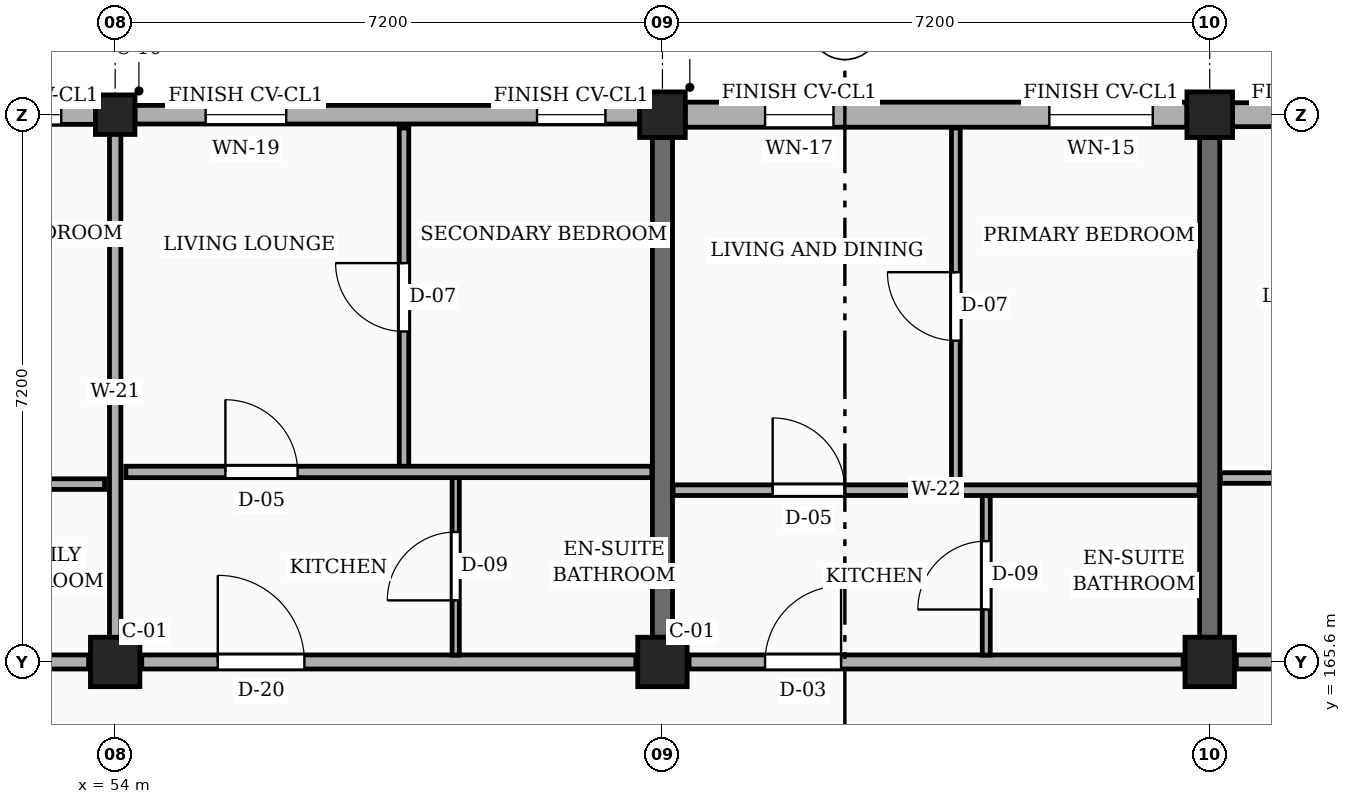
"""IFC4 building model, lengths in metres.
Left out: names, types, materials, properties, quantities, classifications, styles, units other than length and angle.
Written with IfcOpenShell. Run it as: python <this file> out.ifc"""

import sys

from ifc_helpers import new_model, si_unit, direction, frame, frame_2d, origin, origin_2d, place, context, subcontext, project, spatial, rectangle, circle, extrude, element, fill, save


model = new_model("IFC4")
c1 = context("Model", 3, precision=1e-05, world=origin(), true_north=direction((0.0, 1.0)))
c2 = subcontext(c1, "Body", "Model", "MODEL_VIEW")
j1 = project(units=[si_unit("LENGTHUNIT", "METRE"), si_unit("PLANEANGLEUNIT", "RADIAN")], contexts=[c1])
p1 = place(None, origin())
s1 = spatial("IfcSite", under=j1, at=p1, CompositionType="ELEMENT")
p2 = place(p1, origin())
s2 = spatial("IfcBuilding", under=s1, at=p2, CompositionType="ELEMENT")
p3 = place(p2, origin())
s3 = spatial("IfcBuildingStorey", under=s2, at=p3, CompositionType="ELEMENT", Elevation=0.0)
p4 = place(p3, frame((54.0, 165.6, 0.0), z_axis=(0.0, 0.0, 1.0), x_axis=(1.0, 0.0, 0.0)))
e1 = element("IfcColumn", 1, at=p4, inside=s3, PredefinedType="COLUMN", context=c2, shape_type="SweptSolid", body=[
    extrude(rectangle(XDim=0.65, YDim=0.65, at=origin_2d()), origin(), (0.0, 0.0, 1.0), 4.5),
])
p5 = place(p3, frame((54.0, 172.8, 0.0), z_axis=(0.0, 0.0, 1.0), x_axis=(1.0, 0.0, 0.0)))
e2 = element("IfcColumn", 2, at=p5, inside=s3, PredefinedType="COLUMN", context=c2, shape_type="SweptSolid", body=[
    extrude(circle(Radius=0.26, at=origin_2d()), origin(), (0.0, 0.0, 1.0), 4.5),
])
p6 = place(p3, frame((61.2, 165.6, 0.0), z_axis=(0.0, 0.0, 1.0), x_axis=(1.0, 0.0, 0.0)))
e3 = element("IfcColumn", 3, at=p6, inside=s3, PredefinedType="COLUMN", context=c2, shape_type="SweptSolid", body=[
    extrude(rectangle(XDim=0.65, YDim=0.65, at=origin_2d()), origin(), (0.0, 0.0, 1.0), 4.5),
])
p7 = place(p3, frame((61.2, 172.8, 0.0), z_axis=(0.0, 0.0, 1.0), x_axis=(1.0, 0.0, 0.0)))
e4 = element("IfcColumn", 4, at=p7, inside=s3, PredefinedType="COLUMN", context=c2, shape_type="SweptSolid", body=[
    extrude(rectangle(XDim=0.6, YDim=0.6, at=origin_2d()), origin(), (0.0, 0.0, 1.0), 4.5),
])
p8 = place(p3, frame((68.4, 165.6, 0.0), z_axis=(0.0, 0.0, 1.0), x_axis=(1.0, 0.0, 0.0)))
e5 = element("IfcColumn", 5, at=p8, inside=s3, PredefinedType="COLUMN", context=c2, shape_type="SweptSolid", body=[
    extrude(rectangle(XDim=0.65, YDim=0.65, at=origin_2d()), origin(), (0.0, 0.0, 1.0), 4.5),
])
p9 = place(p3, frame((68.4, 172.8, 0.0), z_axis=(0.0, 0.0, 1.0), x_axis=(1.0, 0.0, 0.0)))
e6 = element("IfcColumn", 6, at=p9, inside=s3, PredefinedType="COLUMN", context=c2, shape_type="SweptSolid", body=[
    extrude(rectangle(XDim=0.6, YDim=0.6, at=origin_2d()), origin(), (0.0, 0.0, 1.0), 4.5),
])
for number, where, z_axis, x_axis in (
    (7, (61.2, 165.925, 0.0), (0.0, 0.0, 1.0), (0.0, 1.0, 0.0)),
    (8, (68.4, 165.925, 0.0), (0.0, 0.0, 1.0), (0.0, 1.0, 0.0)),
):
    element("IfcWall", number, at=place(p3, frame(where, z_axis=z_axis, x_axis=x_axis)), inside=s3, PredefinedType="SOLIDWALL", context=c2, shape_type="SweptSolid", body=[
        extrude(rectangle(XDim=6.575, YDim=0.265, at=frame_2d((3.288, 0.0))), origin(), (0.0, 0.0, 1.0), 3.535),
    ])
p10 = place(p3, frame((75.3, 172.8, 0.0), z_axis=(0.0, 0.0, 1.0), x_axis=(-1.0, 0.0, 0.0)))
e9 = element("IfcWall", 9, at=p10, inside=s3, PredefinedType="SOLIDWALL", context=c2, shape_type="SweptSolid", body=[
    extrude(rectangle(XDim=6.6, YDim=0.315, at=frame_2d((3.3, 0.0))), origin(), (0.0, 0.0, 1.0), 3.805),
])
p11 = place(p10, frame((0.45, 0.0, 0.78)))
e10 = element("IfcOpeningElement", 10, at=p11, cuts=e9, PredefinedType="OPENING", context=c2, shape_type="SweptSolid", body=[
    extrude(rectangle(XDim=1.2, YDim=1.26, at=frame_2d((0.6, 0.63))), frame((0.0, 0.167, 0.0), z_axis=(0.0, -1.0, 0.0), x_axis=(1.0, 0.0, 0.0)), (0.0, 0.0, 1.0), 0.335),
])
p12 = place(p10, frame((4.65, 0.0, 0.78)))
e11 = element("IfcOpeningElement", 11, at=p12, cuts=e9, PredefinedType="OPENING", context=c2, shape_type="SweptSolid", body=[
    extrude(rectangle(XDim=1.36, YDim=1.26, at=frame_2d((0.68, 0.63))), frame((0.0, 0.167, 0.0), z_axis=(0.0, -1.0, 0.0), x_axis=(1.0, 0.0, 0.0)), (0.0, 0.0, 1.0), 0.335),
])
p13 = place(p3, frame((68.1, 172.8, 0.0), z_axis=(0.0, 0.0, 1.0), x_axis=(-1.0, 0.0, 0.0)))
e12 = element("IfcWall", 12, at=p13, inside=s3, PredefinedType="SOLIDWALL", context=c2, shape_type="SweptSolid", body=[
    extrude(rectangle(XDim=6.6, YDim=0.33, at=frame_2d((3.3, 0.0))), origin(), (0.0, 0.0, 1.0), 3.805),
])
p14 = place(p13, frame((0.45, 0.0, 0.78)))
e13 = element("IfcOpeningElement", 13, at=p14, cuts=e12, PredefinedType="OPENING", context=c2, shape_type="SweptSolid", body=[
    extrude(rectangle(XDim=1.36, YDim=1.26, at=frame_2d((0.68, 0.63))), frame((0.0, 0.175, 0.0), z_axis=(0.0, -1.0, 0.0), x_axis=(1.0, 0.0, 0.0)), (0.0, 0.0, 1.0), 0.35),
])
p15 = place(p13, frame((4.65, 0.0, 0.78)))
e14 = element("IfcOpeningElement", 14, at=p15, cuts=e12, PredefinedType="OPENING", context=c2, shape_type="SweptSolid", body=[
    extrude(rectangle(XDim=0.9, YDim=1.36, at=frame_2d((0.45, 0.68))), frame((0.0, 0.175, 0.0), z_axis=(0.0, -1.0, 0.0), x_axis=(1.0, 0.0, 0.0)), (0.0, 0.0, 1.0), 0.35),
])
p16 = place(p3, frame((60.9, 172.8, 0.0), z_axis=(0.0, 0.0, 1.0), x_axis=(-1.0, 0.0, 0.0)))
e15 = element("IfcWall", 15, at=p16, inside=s3, PredefinedType="SOLIDWALL", context=c2, shape_type="SweptSolid", body=[
    extrude(rectangle(XDim=6.64, YDim=0.245, at=frame_2d((3.32, 0.0))), origin(), (0.0, 0.0, 1.0), 3.805),
])
p17 = place(p16, frame((0.45, 0.0, 0.78)))
e16 = element("IfcOpeningElement", 16, at=p17, cuts=e15, PredefinedType="OPENING", context=c2, shape_type="SweptSolid", body=[
    extrude(rectangle(XDim=0.9, YDim=1.36, at=frame_2d((0.45, 0.68))), frame((0.0, 0.133, 0.0), z_axis=(0.0, -1.0, 0.0), x_axis=(1.0, 0.0, 0.0)), (0.0, 0.0, 1.0), 0.265),
])
p18 = place(p16, frame((4.65, 0.0, 0.78)))
e17 = element("IfcOpeningElement", 17, at=p18, cuts=e15, PredefinedType="OPENING", context=c2, shape_type="SweptSolid", body=[
    extrude(rectangle(XDim=1.06, YDim=1.36, at=frame_2d((0.53, 0.68))), frame((0.0, 0.133, 0.0), z_axis=(0.0, -1.0, 0.0), x_axis=(1.0, 0.0, 0.0)), (0.0, 0.0, 1.0), 0.265),
])
p19 = place(p3, frame((53.74, 172.8, 0.0), z_axis=(0.0, 0.0, 1.0), x_axis=(-1.0, 0.0, 0.0)))
e18 = element("IfcWall", 18, at=p19, inside=s3, PredefinedType="SOLIDWALL", context=c2, shape_type="SweptSolid", body=[
    extrude(rectangle(XDim=6.64, YDim=0.255, at=frame_2d((3.32, 0.0))), origin(), (0.0, 0.0, 1.0), 3.805),
])
p20 = place(p19, frame((0.45, 0.0, 0.78)))
e19 = element("IfcOpeningElement", 19, at=p20, cuts=e18, PredefinedType="OPENING", context=c2, shape_type="SweptSolid", body=[
    extrude(rectangle(XDim=1.06, YDim=1.36, at=frame_2d((0.53, 0.68))), frame((0.0, 0.137, 0.0), z_axis=(0.0, -1.0, 0.0), x_axis=(1.0, 0.0, 0.0)), (0.0, 0.0, 1.0), 0.275),
])
p21 = place(p19, frame((4.65, 0.0, 0.78)))
e20 = element("IfcOpeningElement", 20, at=p21, cuts=e18, PredefinedType="OPENING", context=c2, shape_type="SweptSolid", body=[
    extrude(rectangle(XDim=1.22, YDim=1.36, at=frame_2d((0.61, 0.68))), frame((0.0, 0.137, 0.0), z_axis=(0.0, -1.0, 0.0), x_axis=(1.0, 0.0, 0.0)), (0.0, 0.0, 1.0), 0.275),
])
p22 = place(p3, frame((47.15, 165.6, 0.0), z_axis=(0.0, 0.0, 1.0), x_axis=(1.0, 0.0, 0.0)))
e21 = element("IfcWall", 21, at=p22, inside=s3, PredefinedType="PARTITIONING", context=c2, shape_type="SweptSolid", body=[
    extrude(rectangle(XDim=6.5, YDim=0.185, at=frame_2d((3.25, 0.0))), origin(), (0.0, 0.0, 1.0), 3.435),
])
p23 = place(p22, frame((1.0, 0.0, 0.0)))
e22 = element("IfcOpeningElement", 22, at=p23, cuts=e21, PredefinedType="OPENING", context=c2, shape_type="SweptSolid", body=[
    extrude(rectangle(XDim=0.94, YDim=2.12, at=frame_2d((0.47, 1.06))), frame((0.0, 0.103, 0.0), z_axis=(0.0, -1.0, 0.0), x_axis=(1.0, 0.0, 0.0)), (0.0, 0.0, 1.0), 0.205),
])
p24 = place(p3, frame((54.35, 165.6, 0.0), z_axis=(0.0, 0.0, 1.0), x_axis=(1.0, 0.0, 0.0)))
e23 = element("IfcWall", 23, at=p24, inside=s3, PredefinedType="PARTITIONING", context=c2, shape_type="SweptSolid", body=[
    extrude(rectangle(XDim=6.5, YDim=0.185, at=frame_2d((3.25, 0.0))), origin(), (0.0, 0.0, 1.0), 3.435),
])
p25 = place(p24, frame((1.0, 0.0, 0.0)))
e24 = element("IfcOpeningElement", 24, at=p25, cuts=e23, PredefinedType="OPENING", context=c2, shape_type="SweptSolid", body=[
    extrude(rectangle(XDim=1.14, YDim=2.18, at=frame_2d((0.57, 1.09))), frame((0.0, 0.103, 0.0), z_axis=(0.0, -1.0, 0.0), x_axis=(1.0, 0.0, 0.0)), (0.0, 0.0, 1.0), 0.205),
])
p26 = place(p3, frame((61.55, 165.6, 0.0), z_axis=(0.0, 0.0, 1.0), x_axis=(1.0, 0.0, 0.0)))
e25 = element("IfcWall", 25, at=p26, inside=s3, PredefinedType="PARTITIONING", context=c2, shape_type="SweptSolid", body=[
    extrude(rectangle(XDim=6.5, YDim=0.185, at=frame_2d((3.25, 0.0))), origin(), (0.0, 0.0, 1.0), 3.435),
])
p27 = place(p26, frame((1.0, 0.0, 0.0)))
e26 = element("IfcOpeningElement", 26, at=p27, cuts=e25, PredefinedType="OPENING", context=c2, shape_type="SweptSolid", body=[
    extrude(rectangle(XDim=1.0, YDim=2.15, at=frame_2d((0.5, 1.075))), frame((0.0, 0.103, 0.0), z_axis=(0.0, -1.0, 0.0), x_axis=(1.0, 0.0, 0.0)), (0.0, 0.0, 1.0), 0.205),
])
p28 = place(p3, frame((68.75, 165.6, 0.0), z_axis=(0.0, 0.0, 1.0), x_axis=(1.0, 0.0, 0.0)))
e27 = element("IfcWall", 27, at=p28, inside=s3, PredefinedType="PARTITIONING", context=c2, shape_type="SweptSolid", body=[
    extrude(rectangle(XDim=6.5, YDim=0.185, at=frame_2d((3.25, 0.0))), origin(), (0.0, 0.0, 1.0), 3.435),
])
p29 = place(p28, frame((1.0, 0.0, 0.0)))
e28 = element("IfcOpeningElement", 28, at=p29, cuts=e27, PredefinedType="OPENING", context=c2, shape_type="SweptSolid", body=[
    extrude(rectangle(XDim=0.94, YDim=2.12, at=frame_2d((0.47, 1.06))), frame((0.0, 0.103, 0.0), z_axis=(0.0, -1.0, 0.0), x_axis=(1.0, 0.0, 0.0)), (0.0, 0.0, 1.0), 0.205),
])
p30 = place(p3, frame((54.0, 165.69, 0.0), z_axis=(0.0, 0.0, 1.0), x_axis=(0.0, 1.0, 0.0)))
e29 = element("IfcWall", 29, at=p30, inside=s3, PredefinedType="PARTITIONING", context=c2, shape_type="SweptSolid", body=[
    extrude(rectangle(XDim=6.935, YDim=0.15, at=frame_2d((3.468, 0.0))), origin(), (0.0, 0.0, 1.0), 3.485),
])
p31 = place(p3, frame((46.94, 167.94, 0.0), z_axis=(0.0, 0.0, 1.0), x_axis=(1.0, 0.0, 0.0)))
e30 = element("IfcWall", 30, at=p31, inside=s3, PredefinedType="PARTITIONING", context=c2, shape_type="SweptSolid", body=[
    extrude(rectangle(XDim=6.92, YDim=0.14, at=frame_2d((3.46, 0.0))), origin(), (0.0, 0.0, 1.0), 3.67),
])
p32 = place(p31, frame((1.31, 0.0, 0.0)))
e31 = element("IfcOpeningElement", 31, at=p32, cuts=e30, PredefinedType="OPENING", context=c2, shape_type="SweptSolid", body=[
    extrude(rectangle(XDim=0.92, YDim=2.1, at=frame_2d((0.46, 1.05))), frame((0.0, 0.08, 0.0), z_axis=(0.0, -1.0, 0.0), x_axis=(1.0, 0.0, 0.0)), (0.0, 0.0, 1.0), 0.16),
])
p33 = place(p3, frame((57.8, 168.17, 0.0), z_axis=(0.0, 0.0, 1.0), x_axis=(0.0, 1.0, 0.0)))
e32 = element("IfcWall", 32, at=p33, inside=s3, PredefinedType="PARTITIONING", context=c2, shape_type="SweptSolid", body=[
    extrude(rectangle(XDim=4.455, YDim=0.125, at=frame_2d((2.228, 0.0))), origin(), (0.0, 0.0, 1.0), 3.67),
])
p34 = place(p33, frame((1.778, 0.0, 0.0)))
e33 = element("IfcOpeningElement", 33, at=p34, cuts=e32, PredefinedType="OPENING", context=c2, shape_type="SweptSolid", body=[
    extrude(rectangle(XDim=0.9, YDim=2.1, at=frame_2d((0.45, 1.05))), frame((0.0, 0.073, 0.0), z_axis=(0.0, -1.0, 0.0), x_axis=(1.0, 0.0, 0.0)), (0.0, 0.0, 1.0), 0.145),
])
p35 = place(p3, frame((58.48, 165.69, 0.0), z_axis=(0.0, 0.0, 1.0), x_axis=(0.0, 1.0, 0.0)))
e34 = element("IfcWall", 34, at=p35, inside=s3, PredefinedType="PARTITIONING", context=c2, shape_type="SweptSolid", body=[
    extrude(rectangle(XDim=2.34, YDim=0.095, at=frame_2d((1.17, 0.0))), origin(), (0.0, 0.0, 1.0), 3.67),
])
p36 = place(p35, frame((0.72, 0.0, 0.0)))
e35 = element("IfcOpeningElement", 35, at=p36, cuts=e34, PredefinedType="OPENING", context=c2, shape_type="SweptSolid", body=[
    extrude(rectangle(XDim=0.9, YDim=2.05, at=frame_2d((0.45, 1.025))), frame((0.0, 0.058, 0.0), z_axis=(0.0, -1.0, 0.0), x_axis=(1.0, 0.0, 0.0)), (0.0, 0.0, 1.0), 0.115),
])
p37 = place(p3, frame((54.14, 168.1, 0.0), z_axis=(0.0, 0.0, 1.0), x_axis=(1.0, 0.0, 0.0)))
e36 = element("IfcWall", 36, at=p37, inside=s3, PredefinedType="PARTITIONING", context=c2, shape_type="SweptSolid", body=[
    extrude(rectangle(XDim=6.92, YDim=0.15, at=frame_2d((3.46, 0.0))), origin(), (0.0, 0.0, 1.0), 3.67),
])
p38 = place(p37, frame((1.31, 0.0, 0.0)))
e37 = element("IfcOpeningElement", 37, at=p38, cuts=e36, PredefinedType="OPENING", context=c2, shape_type="SweptSolid", body=[
    extrude(rectangle(XDim=0.95, YDim=2.1, at=frame_2d((0.475, 1.05))), frame((0.0, 0.085, 0.0), z_axis=(0.0, -1.0, 0.0), x_axis=(1.0, 0.0, 0.0)), (0.0, 0.0, 1.0), 0.17),
])
p39 = place(p3, frame((65.06, 167.93, 0.0), z_axis=(0.0, 0.0, 1.0), x_axis=(0.0, 1.0, 0.0)))
e38 = element("IfcWall", 38, at=p39, inside=s3, PredefinedType="PARTITIONING", context=c2, shape_type="SweptSolid", body=[
    extrude(rectangle(XDim=4.695, YDim=0.115, at=frame_2d((2.348, 0.0))), origin(), (0.0, 0.0, 1.0), 3.67),
])
p40 = place(p39, frame((1.897, 0.0, 0.0)))
e39 = element("IfcOpeningElement", 39, at=p40, cuts=e38, PredefinedType="OPENING", context=c2, shape_type="SweptSolid", body=[
    extrude(rectangle(XDim=0.9, YDim=2.1, at=frame_2d((0.45, 1.05))), frame((0.0, 0.067, 0.0), z_axis=(0.0, -1.0, 0.0), x_axis=(1.0, 0.0, 0.0)), (0.0, 0.0, 1.0), 0.135),
])
p41 = place(p3, frame((65.46, 165.69, 0.0), z_axis=(0.0, 0.0, 1.0), x_axis=(0.0, 1.0, 0.0)))
e40 = element("IfcWall", 40, at=p41, inside=s3, PredefinedType="PARTITIONING", context=c2, shape_type="SweptSolid", body=[
    extrude(rectangle(XDim=2.1, YDim=0.105, at=frame_2d((1.05, 0.0))), origin(), (0.0, 0.0, 1.0), 3.67),
])
p42 = place(p41, frame((0.6, 0.0, 0.0)))
e41 = element("IfcOpeningElement", 41, at=p42, cuts=e40, PredefinedType="OPENING", context=c2, shape_type="SweptSolid", body=[
    extrude(rectangle(XDim=0.9, YDim=2.05, at=frame_2d((0.45, 1.025))), frame((0.0, 0.062, 0.0), z_axis=(0.0, -1.0, 0.0), x_axis=(1.0, 0.0, 0.0)), (0.0, 0.0, 1.0), 0.125),
])
p43 = place(p3, frame((61.34, 167.86, 0.0), z_axis=(0.0, 0.0, 1.0), x_axis=(1.0, 0.0, 0.0)))
e42 = element("IfcWall", 42, at=p43, inside=s3, PredefinedType="PARTITIONING", context=c2, shape_type="SweptSolid", body=[
    extrude(rectangle(XDim=6.92, YDim=0.14, at=frame_2d((3.46, 0.0))), origin(), (0.0, 0.0, 1.0), 3.67),
])
p44 = place(p43, frame((1.31, 0.0, 0.0)))
e43 = element("IfcOpeningElement", 43, at=p44, cuts=e42, PredefinedType="OPENING", context=c2, shape_type="SweptSolid", body=[
    extrude(rectangle(XDim=0.95, YDim=2.1, at=frame_2d((0.475, 1.05))), frame((0.0, 0.08, 0.0), z_axis=(0.0, -1.0, 0.0), x_axis=(1.0, 0.0, 0.0)), (0.0, 0.0, 1.0), 0.16),
])
p45 = place(p3, frame((68.54, 168.02, 0.0), z_axis=(0.0, 0.0, 1.0), x_axis=(1.0, 0.0, 0.0)))
e44 = element("IfcWall", 44, at=p45, inside=s3, PredefinedType="PARTITIONING", context=c2, shape_type="SweptSolid", body=[
    extrude(rectangle(XDim=6.885, YDim=0.14, at=frame_2d((3.442, 0.0))), origin(), (0.0, 0.0, 1.0), 3.67),
])
p46 = place(p45, frame((1.31, 0.0, 0.0)))
e45 = element("IfcOpeningElement", 45, at=p46, cuts=e44, PredefinedType="OPENING", context=c2, shape_type="SweptSolid", body=[
    extrude(rectangle(XDim=0.92, YDim=2.1, at=frame_2d((0.46, 1.05))), frame((0.0, 0.08, 0.0), z_axis=(0.0, -1.0, 0.0), x_axis=(1.0, 0.0, 0.0)), (0.0, 0.0, 1.0), 0.16),
])
p47 = place(p14, origin())
e46 = element("IfcWindow", 46, at=p47, inside=s3, PartitioningType="SINGLE_PANEL", PredefinedType="WINDOW", context=c2, shape_type="SweptSolid", body=[
    extrude(rectangle(XDim=1.36, YDim=1.26, at=frame_2d((0.68, 0.63))), frame((0.0, 0.03, 0.0), z_axis=(0.0, -1.0, 0.0), x_axis=(1.0, 0.0, 0.0)), (0.0, 0.0, 1.0), 0.06),
])
fill(e13, e46)
p48 = place(p15, origin())
e47 = element("IfcWindow", 47, at=p48, inside=s3, PartitioningType="SINGLE_PANEL", PredefinedType="WINDOW", context=c2, shape_type="SweptSolid", body=[
    extrude(rectangle(XDim=0.9, YDim=1.36, at=frame_2d((0.45, 0.68))), frame((0.0, 0.03, 0.0), z_axis=(0.0, -1.0, 0.0), x_axis=(1.0, 0.0, 0.0)), (0.0, 0.0, 1.0), 0.06),
])
fill(e14, e47)
p49 = place(p17, origin())
e48 = element("IfcWindow", 48, at=p49, inside=s3, PartitioningType="SINGLE_PANEL", PredefinedType="WINDOW", context=c2, shape_type="SweptSolid", body=[
    extrude(rectangle(XDim=0.9, YDim=1.36, at=frame_2d((0.45, 0.68))), frame((0.0, 0.03, 0.0), z_axis=(0.0, -1.0, 0.0), x_axis=(1.0, 0.0, 0.0)), (0.0, 0.0, 1.0), 0.06),
])
fill(e16, e48)
p50 = place(p18, origin())
e49 = element("IfcWindow", 49, at=p50, inside=s3, PartitioningType="SINGLE_PANEL", PredefinedType="WINDOW", context=c2, shape_type="SweptSolid", body=[
    extrude(rectangle(XDim=1.06, YDim=1.36, at=frame_2d((0.53, 0.68))), frame((0.0, 0.03, 0.0), z_axis=(0.0, -1.0, 0.0), x_axis=(1.0, 0.0, 0.0)), (0.0, 0.0, 1.0), 0.06),
])
fill(e17, e49)
p51 = place(p20, origin())
e50 = element("IfcWindow", 50, at=p51, inside=s3, PartitioningType="SINGLE_PANEL", PredefinedType="WINDOW", context=c2, shape_type="SweptSolid", body=[
    extrude(rectangle(XDim=1.06, YDim=1.36, at=frame_2d((0.53, 0.68))), frame((0.0, 0.03, 0.0), z_axis=(0.0, -1.0, 0.0), x_axis=(1.0, 0.0, 0.0)), (0.0, 0.0, 1.0), 0.06),
])
fill(e19, e50)
p52 = place(p25, origin())
e51 = element("IfcDoor", 51, at=p52, inside=s3, OperationType="SINGLE_SWING_LEFT", PredefinedType="DOOR", context=c2, shape_type="SweptSolid", body=[
    extrude(rectangle(XDim=1.14, YDim=2.18, at=frame_2d((0.57, 1.09))), frame((0.0, 0.025, 0.0), z_axis=(0.0, -1.0, 0.0), x_axis=(1.0, 0.0, 0.0)), (0.0, 0.0, 1.0), 0.05),
])
fill(e24, e51)
p53 = place(p27, origin())
e52 = element("IfcDoor", 52, at=p53, inside=s3, OperationType="SINGLE_SWING_RIGHT", PredefinedType="DOOR", context=c2, shape_type="SweptSolid", body=[
    extrude(rectangle(XDim=1.0, YDim=2.15, at=frame_2d((0.5, 1.075))), frame((0.0, 0.025, 0.0), z_axis=(0.0, -1.0, 0.0), x_axis=(1.0, 0.0, 0.0)), (0.0, 0.0, 1.0), 0.05),
])
fill(e26, e52)
p54 = place(p34, origin())
e53 = element("IfcDoor", 53, at=p54, inside=s3, OperationType="SINGLE_SWING_RIGHT", PredefinedType="DOOR", context=c2, shape_type="SweptSolid", body=[
    extrude(rectangle(XDim=0.9, YDim=2.1, at=frame_2d((0.45, 1.05))), frame((0.0, 0.025, 0.0), z_axis=(0.0, -1.0, 0.0), x_axis=(1.0, 0.0, 0.0)), (0.0, 0.0, 1.0), 0.05),
])
fill(e33, e53)
p55 = place(p36, origin())
e54 = element("IfcDoor", 54, at=p55, inside=s3, OperationType="SINGLE_SWING_LEFT", PredefinedType="DOOR", context=c2, shape_type="SweptSolid", body=[
    extrude(rectangle(XDim=0.9, YDim=2.05, at=frame_2d((0.45, 1.025))), frame((0.0, 0.025, 0.0), z_axis=(0.0, -1.0, 0.0), x_axis=(1.0, 0.0, 0.0)), (0.0, 0.0, 1.0), 0.05),
])
fill(e35, e54)
p56 = place(p38, origin())
e55 = element("IfcDoor", 55, at=p56, inside=s3, OperationType="SINGLE_SWING_LEFT", PredefinedType="DOOR", context=c2, shape_type="SweptSolid", body=[
    extrude(rectangle(XDim=0.95, YDim=2.1, at=frame_2d((0.475, 1.05))), frame((0.0, 0.025, 0.0), z_axis=(0.0, -1.0, 0.0), x_axis=(1.0, 0.0, 0.0)), (0.0, 0.0, 1.0), 0.05),
])
fill(e37, e55)
p57 = place(p40, origin())
e56 = element("IfcDoor", 56, at=p57, inside=s3, OperationType="SINGLE_SWING_RIGHT", PredefinedType="DOOR", context=c2, shape_type="SweptSolid", body=[
    extrude(rectangle(XDim=0.9, YDim=2.1, at=frame_2d((0.45, 1.05))), frame((0.0, 0.025, 0.0), z_axis=(0.0, -1.0, 0.0), x_axis=(1.0, 0.0, 0.0)), (0.0, 0.0, 1.0), 0.05),
])
fill(e39, e56)
p58 = place(p42, origin())
e57 = element("IfcDoor", 57, at=p58, inside=s3, OperationType="SINGLE_SWING_LEFT", PredefinedType="DOOR", context=c2, shape_type="SweptSolid", body=[
    extrude(rectangle(XDim=0.9, YDim=2.05, at=frame_2d((0.45, 1.025))), frame((0.0, 0.025, 0.0), z_axis=(0.0, -1.0, 0.0), x_axis=(1.0, 0.0, 0.0)), (0.0, 0.0, 1.0), 0.05),
])
fill(e41, e57)
p59 = place(p44, origin())
e58 = element("IfcDoor", 58, at=p59, inside=s3, OperationType="SINGLE_SWING_LEFT", PredefinedType="DOOR", context=c2, shape_type="SweptSolid", body=[
    extrude(rectangle(XDim=0.95, YDim=2.1, at=frame_2d((0.475, 1.05))), frame((0.0, 0.025, 0.0), z_axis=(0.0, -1.0, 0.0), x_axis=(1.0, 0.0, 0.0)), (0.0, 0.0, 1.0), 0.05),
])
fill(e43, e58)
save(model, sys.argv[1])
